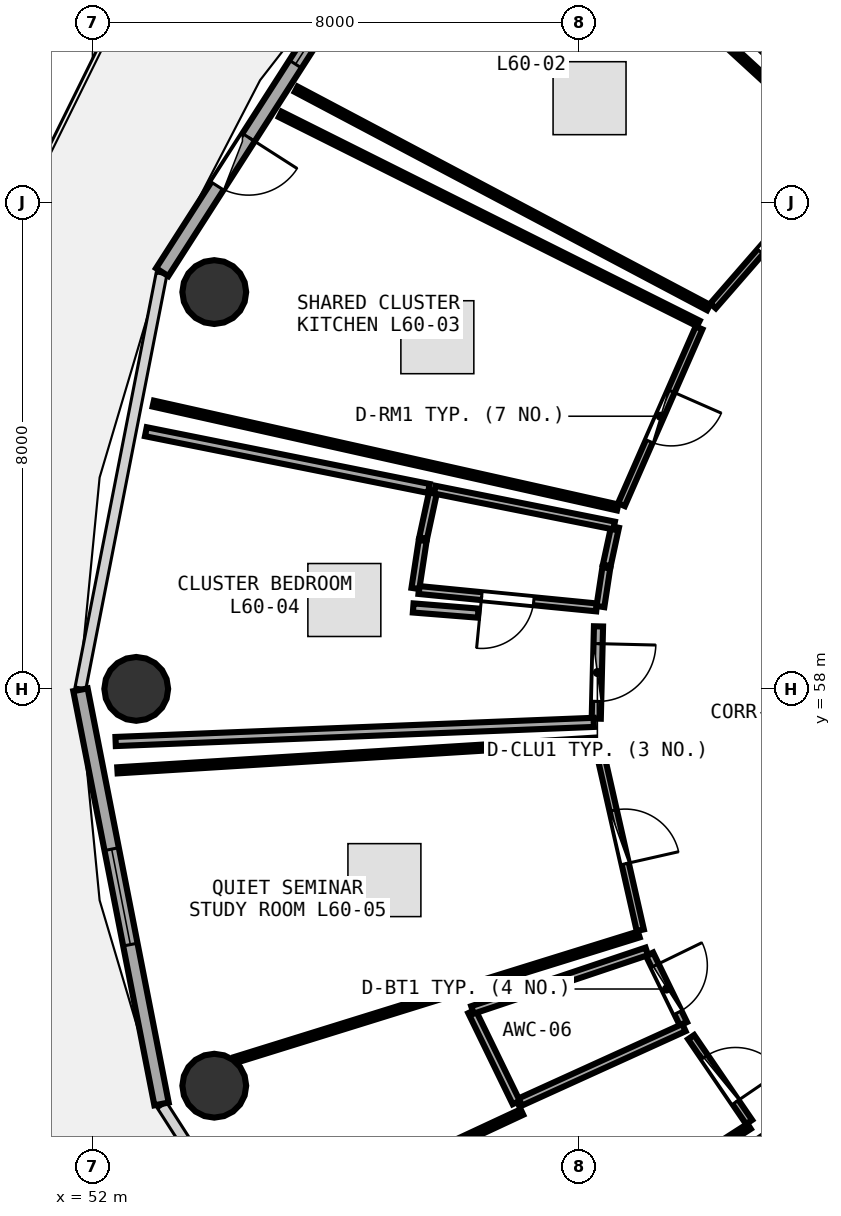
"""IFC4 building model, lengths in metres.
Left out: names, types, materials, properties, quantities, classifications, styles, units other than length and angle.
Written with IfcOpenShell. Run it as: python <this file> out.ifc"""

import sys

from ifc_helpers import new_model, si_unit, direction, frame, frame_2d, origin, origin_2d, place, context, subcontext, project, spatial, rectangle, circle, extrude, element, fill, save


model = new_model("IFC4")
c1 = context("Model", 3, precision=1e-05, world=origin(), true_north=direction((0.0, 1.0)))
c2 = subcontext(c1, "Body", "Model", "MODEL_VIEW")
j1 = project(units=[si_unit("LENGTHUNIT", "METRE"), si_unit("PLANEANGLEUNIT", "RADIAN")], contexts=[c1])
p1 = place(None, origin())
s1 = spatial("IfcSite", under=j1, at=p1, CompositionType="ELEMENT")
p2 = place(p1, origin())
s2 = spatial("IfcBuilding", under=s1, at=p2, CompositionType="ELEMENT")
p3 = place(p2, frame((0.0, 0.0, 234.45)))
s3 = spatial("IfcBuildingStorey", under=s2, at=p3, CompositionType="ELEMENT", Elevation=234.45)
for number, where, z_axis, x_axis in (
    (1, (54.003, 64.526, 0.0), (0.0, 0.0, 1.0), (1.0, 0.0, 0.0)),
    (2, (52.72, 58.0, 0.0), (0.0, 0.0, 1.0), (1.0, 0.0, 0.0)),
    (3, (54.003, 51.474, 0.0), (0.0, 0.0, 1.0), (1.0, 0.0, 0.0)),
):
    element("IfcColumn", number, at=place(p3, frame(where, z_axis=z_axis, x_axis=x_axis)), inside=s3, PredefinedType="COLUMN", context=c2, shape_type="SweptSolid", body=[
        extrude(circle(Radius=0.525, at=origin_2d()), origin(), (0.0, 0.0, 1.0), 3.75),
    ])
p4 = place(p3, frame((56.986, 70.843, 0.0), z_axis=(0.0, 0.0, 1.0), x_axis=(-0.539539512973, -0.841960280501, 0.0)))
e4 = element("IfcWall", 4, at=p4, inside=s3, PredefinedType="SOLIDWALL", context=c2, shape_type="SweptSolid", body=[
    extrude(rectangle(XDim=7.115, YDim=0.24, at=frame_2d((3.557, 0.0))), origin(), (0.0, 0.0, 1.0), 3.475),
])
p5 = place(p4, frame((4.482, 0.0, 0.0)))
e5 = element("IfcOpeningElement", 5, at=p5, cuts=e4, PredefinedType="OPENING", context=c2, shape_type="SweptSolid", body=[
    extrude(rectangle(XDim=0.95, YDim=2.1, at=frame_2d((0.475, 1.05))), frame((0.0, 0.13, 0.0), z_axis=(0.0, -1.0, 0.0), x_axis=(1.0, 0.0, 0.0)), (0.0, 0.0, 1.0), 0.26),
])
p6 = place(p4, frame((1.852, 0.0, 0.85)))
e6 = element("IfcOpeningElement", 6, at=p6, cuts=e4, PredefinedType="OPENING", context=c2, shape_type="SweptSolid", body=[
    extrude(rectangle(XDim=1.2, YDim=1.45, at=frame_2d((0.6, 0.725))), frame((0.0, 0.13, 0.0), z_axis=(0.0, -1.0, 0.0), x_axis=(1.0, 0.0, 0.0)), (0.0, 0.0, 1.0), 0.26),
])
p7 = place(p3, frame((51.803, 57.985, 0.0), z_axis=(0.0, 0.0, 1.0), x_axis=(0.192069055673, -0.981381413036, 0.0)))
e7 = element("IfcWall", 7, at=p7, inside=s3, PredefinedType="SOLIDWALL", context=c2, shape_type="SweptSolid", body=[
    extrude(rectangle(XDim=6.94, YDim=0.24, at=frame_2d((3.47, 0.0))), origin(), (0.0, 0.0, 1.0), 3.475),
])
p8 = place(p7, frame((2.67, 0.0, 0.85)))
e8 = element("IfcOpeningElement", 8, at=p8, cuts=e7, PredefinedType="OPENING", context=c2, shape_type="SweptSolid", body=[
    extrude(rectangle(XDim=1.6, YDim=1.45, at=frame_2d((0.8, 0.725))), frame((0.0, 0.13, 0.0), z_axis=(0.0, -1.0, 0.0), x_axis=(1.0, 0.0, 0.0)), (0.0, 0.0, 1.0), 0.26),
])
p9 = place(p3, frame((64.352, 66.763, 0.0), z_axis=(0.0, 0.0, 1.0), x_axis=(-0.656587461417, -0.75424989593, 0.0)))
e9 = element("IfcWall", 9, at=p9, inside=s3, PredefinedType="PARTITIONING", context=c2, shape_type="SweptSolid", body=[
    extrude(rectangle(XDim=3.267, YDim=0.12, at=frame_2d((1.634, 0.0))), origin(), (0.0, 0.0, 1.0), 3.025),
])
p10 = place(p9, frame((1.184, 0.0, 0.0)))
e10 = element("IfcOpeningElement", 10, at=p10, cuts=e9, PredefinedType="OPENING", context=c2, shape_type="SweptSolid", body=[
    extrude(rectangle(XDim=0.9, YDim=2.08, at=frame_2d((0.45, 1.04))), frame((0.0, 0.07, 0.0), z_axis=(0.0, -1.0, 0.0), x_axis=(1.0, 0.0, 0.0)), (0.0, 0.0, 1.0), 0.14),
])
p11 = place(p3, frame((61.976, 63.937, 0.0), z_axis=(0.0, 0.0, 1.0), x_axis=(-0.401802923717, -0.91572616567, 0.0)))
e11 = element("IfcWall", 11, at=p11, inside=s3, PredefinedType="PARTITIONING", context=c2, shape_type="SweptSolid", body=[
    extrude(rectangle(XDim=3.175, YDim=0.12, at=frame_2d((1.587, 0.0))), origin(), (0.0, 0.0, 1.0), 3.235),
])
p12 = place(p11, frame((1.137, 0.0, 0.0)))
e12 = element("IfcOpeningElement", 12, at=p12, cuts=e11, PredefinedType="OPENING", context=c2, shape_type="SweptSolid", body=[
    extrude(rectangle(XDim=0.9, YDim=2.08, at=frame_2d((0.45, 1.04))), frame((0.0, 0.07, 0.0), z_axis=(0.0, -1.0, 0.0), x_axis=(1.0, 0.0, 0.0)), (0.0, 0.0, 1.0), 0.14),
])
p13 = place(p3, frame((60.291, 59.34, 0.0), z_axis=(0.0, 0.0, 1.0), x_axis=(-0.995236750248, 0.097487491277, 0.0)))
e13 = element("IfcWall", 13, at=p13, inside=s3, PredefinedType="PLUMBINGWALL", context=c2, shape_type="SweptSolid", body=[
    extrude(rectangle(XDim=2.938, YDim=0.13, at=frame_2d((1.469, 0.0))), origin(), (0.0, 0.0, 1.0), 3.175),
])
p14 = place(p13, frame((1.039, 0.0, 0.0)))
e14 = element("IfcOpeningElement", 14, at=p14, cuts=e13, PredefinedType="OPENING", context=c2, shape_type="SweptSolid", body=[
    extrude(rectangle(XDim=0.86, YDim=2.05, at=frame_2d((0.43, 1.025))), frame((0.0, 0.075, 0.0), z_axis=(0.0, -1.0, 0.0), x_axis=(1.0, 0.0, 0.0)), (0.0, 0.0, 1.0), 0.15),
])
p15 = place(p3, frame((60.323, 59.028, 0.0), z_axis=(0.0, 0.0, 1.0), x_axis=(-0.024453580127, -0.999700966499, 0.0)))
e15 = element("IfcWall", 15, at=p15, inside=s3, PredefinedType="PARTITIONING", context=c2, shape_type="SweptSolid", body=[
    extrude(rectangle(XDim=1.518, YDim=0.15, at=frame_2d((0.759, 0.0))), origin(), (0.0, 0.0, 1.0), 3.025),
])
p16 = place(p15, frame((0.284, 0.0, 0.0)))
e16 = element("IfcOpeningElement", 16, at=p16, cuts=e15, PredefinedType="OPENING", context=c2, shape_type="SweptSolid", body=[
    extrude(rectangle(XDim=0.95, YDim=2.08, at=frame_2d((0.475, 1.04))), frame((0.0, 0.085, 0.0), z_axis=(0.0, -1.0, 0.0), x_axis=(1.0, 0.0, 0.0)), (0.0, 0.0, 1.0), 0.17),
])
p17 = place(p3, frame((60.316, 57.093, 0.0), z_axis=(0.0, 0.0, 1.0), x_axis=(0.22091500264, -0.975293064473, 0.0)))
e17 = element("IfcWall", 17, at=p17, inside=s3, PredefinedType="PARTITIONING", context=c2, shape_type="SweptSolid", body=[
    extrude(rectangle(XDim=3.139, YDim=0.12, at=frame_2d((1.569, 0.0))), origin(), (0.0, 0.0, 1.0), 3.48),
])
p18 = place(p17, frame((1.119, 0.0, 0.0)))
e18 = element("IfcOpeningElement", 18, at=p18, cuts=e17, PredefinedType="OPENING", context=c2, shape_type="SweptSolid", body=[
    extrude(rectangle(XDim=0.9, YDim=2.08, at=frame_2d((0.45, 1.04))), frame((0.0, 0.07, 0.0), z_axis=(0.0, -1.0, 0.0), x_axis=(1.0, 0.0, 0.0)), (0.0, 0.0, 1.0), 0.14),
])
p19 = place(p3, frame((61.162, 53.636, 0.0), z_axis=(0.0, 0.0, 1.0), x_axis=(0.437981349822, -0.898984058373, 0.0)))
e19 = element("IfcWall", 19, at=p19, inside=s3, PredefinedType="PLUMBINGWALL", context=c2, shape_type="SweptSolid", body=[
    extrude(rectangle(XDim=1.273, YDim=0.13, at=frame_2d((0.636, 0.0))), origin(), (0.0, 0.0, 1.0), 3.235),
])
p20 = place(p19, frame((0.206, 0.0, 0.0)))
e20 = element("IfcOpeningElement", 20, at=p20, cuts=e19, PredefinedType="OPENING", context=c2, shape_type="SweptSolid", body=[
    extrude(rectangle(XDim=0.86, YDim=2.05, at=frame_2d((0.43, 1.025))), frame((0.0, 0.075, 0.0), z_axis=(0.0, -1.0, 0.0), x_axis=(1.0, 0.0, 0.0)), (0.0, 0.0, 1.0), 0.15),
])
p21 = place(p3, frame((61.846, 52.273, 0.0), z_axis=(0.0, 0.0, 1.0), x_axis=(0.563860796601, -0.825869845712, 0.0)))
e21 = element("IfcWall", 21, at=p21, inside=s3, PredefinedType="PARTITIONING", context=c2, shape_type="SweptSolid", body=[
    extrude(rectangle(XDim=1.691, YDim=0.12, at=frame_2d((0.846, 0.0))), origin(), (0.0, 0.0, 1.0), 3.025),
])
p22 = place(p21, frame((0.396, 0.0, 0.0)))
e22 = element("IfcOpeningElement", 22, at=p22, cuts=e21, PredefinedType="OPENING", context=c2, shape_type="SweptSolid", body=[
    extrude(rectangle(XDim=0.9, YDim=2.08, at=frame_2d((0.45, 1.04))), frame((0.0, 0.07, 0.0), z_axis=(0.0, -1.0, 0.0), x_axis=(1.0, 0.0, 0.0)), (0.0, 0.0, 1.0), 0.14),
])
p23 = place(p3, frame((64.605, 67.044, 0.0), z_axis=(0.0, 0.0, 1.0), x_axis=(-0.719927885424, 0.694048874208, 0.0)))
e23 = element("IfcWall", 23, at=p23, inside=s3, PredefinedType="PARTITIONING", context=c2, shape_type="SweptSolid", body=[
    extrude(rectangle(XDim=7.453, YDim=0.15, at=frame_2d((3.727, 0.0))), origin(), (0.0, 0.0, 1.0), 3.075),
])
p24 = place(p3, frame((62.132, 64.272, 0.0), z_axis=(0.0, 0.0, 1.0), x_axis=(-0.883813456485, 0.467839474752, 0.0)))
e24 = element("IfcWall", 24, at=p24, inside=s3, PredefinedType="PARTITIONING", context=c2, shape_type="SweptSolid", body=[
    extrude(rectangle(XDim=7.673, YDim=0.1, at=frame_2d((3.836, 0.0))), origin(), (0.0, 0.0, 1.0), 3.025),
])
p25 = place(p3, frame((58.857, 71.888, 0.0), z_axis=(0.0, 0.0, 1.0), x_axis=(0.736669736632, -0.676252688815, 0.0)))
e25 = element("IfcWall", 25, at=p25, inside=s3, PredefinedType="PARTITIONING", context=c2, shape_type="SweptSolid", body=[
    extrude(rectangle(XDim=7.472, YDim=0.1, at=frame_2d((3.736, 0.0))), origin(), (0.0, 0.0, 1.0), 3.075),
])
p26 = place(p3, frame((60.637, 60.984, 0.0), z_axis=(0.0, 0.0, 1.0), x_axis=(-0.97589770928, 0.218228460612, 0.0)))
e26 = element("IfcWall", 26, at=p26, inside=s3, PredefinedType="PARTITIONING", context=c2, shape_type="SweptSolid", body=[
    extrude(rectangle(XDim=7.826, YDim=0.1, at=frame_2d((3.913, 0.0))), origin(), (0.0, 0.0, 1.0), 3.075),
])
p27 = place(p3, frame((55.088, 67.448, 0.0), z_axis=(0.0, 0.0, 1.0), x_axis=(0.894433542293, -0.447200892688, 0.0)))
e27 = element("IfcWall", 27, at=p27, inside=s3, PredefinedType="PARTITIONING", context=c2, shape_type="SweptSolid", body=[
    extrude(rectangle(XDim=7.688, YDim=0.1, at=frame_2d((3.844, 0.0))), origin(), (0.0, 0.0, 1.0), 3.025),
])
p28 = place(p3, frame((60.595, 60.663, 0.0), z_axis=(0.0, 0.0, 1.0), x_axis=(-0.211050082749, -0.977475249084, 0.0)))
e28 = element("IfcWall", 28, at=p28, inside=s3, PredefinedType="PLUMBINGWALL", context=c2, shape_type="SweptSolid", body=[
    extrude(rectangle(XDim=0.647, YDim=0.13, at=frame_2d((0.323, 0.0))), origin(), (0.0, 0.0, 1.0), 3.48),
])
p29 = place(p3, frame((60.451, 59.991, 0.0), z_axis=(0.0, 0.0, 1.0), x_axis=(-0.150321319766, -0.988637193729, 0.0)))
e29 = element("IfcWall", 29, at=p29, inside=s3, PredefinedType="PLUMBINGWALL", context=c2, shape_type="SweptSolid", body=[
    extrude(rectangle(XDim=0.645, YDim=0.13, at=frame_2d((0.322, 0.0))), origin(), (0.0, 0.0, 1.0), 3.48),
])
p30 = place(p3, frame((57.311, 59.652, 0.0), z_axis=(0.0, 0.0, 1.0), x_axis=(0.150331405734, 0.988635660114, 0.0)))
e30 = element("IfcWall", 30, at=p30, inside=s3, PredefinedType="PLUMBINGWALL", context=c2, shape_type="SweptSolid", body=[
    extrude(rectangle(XDim=0.797, YDim=0.13, at=frame_2d((0.399, 0.0))), origin(), (0.0, 0.0, 1.0), 3.48),
])
p31 = place(p3, frame((57.438, 60.479, 0.0), z_axis=(0.0, 0.0, 1.0), x_axis=(0.210843597485, 0.977519809211, 0.0)))
e31 = element("IfcWall", 31, at=p31, inside=s3, PredefinedType="PLUMBINGWALL", context=c2, shape_type="SweptSolid", body=[
    extrude(rectangle(XDim=0.799, YDim=0.13, at=frame_2d((0.399, 0.0))), origin(), (0.0, 0.0, 1.0), 3.48),
])
p32 = place(p3, frame((57.631, 61.276, 0.0), z_axis=(0.0, 0.0, 1.0), x_axis=(0.980543188147, -0.196303479793, 0.0)))
e32 = element("IfcWall", 32, at=p32, inside=s3, PredefinedType="PLUMBINGWALL", context=c2, shape_type="SweptSolid", body=[
    extrude(rectangle(XDim=3.007, YDim=0.13, at=frame_2d((1.504, 0.0))), origin(), (0.0, 0.0, 1.0), 3.175),
])
p33 = place(p3, frame((60.244, 57.449, 0.0), z_axis=(0.0, 0.0, 1.0), x_axis=(-0.999198776547, -0.040022555479, 0.0)))
e33 = element("IfcWall", 33, at=p33, inside=s3, PredefinedType="PARTITIONING", context=c2, shape_type="SweptSolid", body=[
    extrude(rectangle(XDim=7.869, YDim=0.15, at=frame_2d((3.935, 0.0))), origin(), (0.0, 0.0, 1.0), 3.075),
])
p34 = place(p3, frame((52.878, 62.229, 0.0), z_axis=(0.0, 0.0, 1.0), x_axis=(0.980491563171, -0.196561172538, 0.0)))
e34 = element("IfcWall", 34, at=p34, inside=s3, PredefinedType="PARTITIONING", context=c2, shape_type="SweptSolid", body=[
    extrude(rectangle(XDim=4.747, YDim=0.15, at=frame_2d((2.374, 0.0))), origin(), (0.0, 0.0, 1.0), 3.075),
])
p35 = place(p3, frame((57.275, 59.331, 0.0), z_axis=(0.0, 0.0, 1.0), x_axis=(0.996837682514, -0.079464675924, 0.0)))
e35 = element("IfcWall", 35, at=p35, inside=s3, PredefinedType="PARTITIONING", context=c2, shape_type="SweptSolid", body=[
    extrude(rectangle(XDim=1.072, YDim=0.15, at=frame_2d((0.536, 0.0))), origin(), (0.0, 0.0, 1.0), 3.175),
])
p36 = place(p3, frame((60.985, 53.961, 0.0), z_axis=(0.0, 0.0, 1.0), x_axis=(-0.954952218503, -0.29675960031, 0.0)))
e36 = element("IfcWall", 36, at=p36, inside=s3, PredefinedType="PARTITIONING", context=c2, shape_type="SweptSolid", body=[
    extrude(rectangle(XDim=6.946, YDim=0.1, at=frame_2d((3.473, 0.0))), origin(), (0.0, 0.0, 1.0), 3.175),
])
p37 = place(p3, frame((52.411, 56.66, 0.0), z_axis=(0.0, 0.0, 1.0), x_axis=(0.998074132124, 0.06203246557, 0.0)))
e37 = element("IfcWall", 37, at=p37, inside=s3, PredefinedType="PARTITIONING", context=c2, shape_type="SweptSolid", body=[
    extrude(rectangle(XDim=7.867, YDim=0.1, at=frame_2d((3.934, 0.0))), origin(), (0.0, 0.0, 1.0), 3.075),
])
p38 = place(p3, frame((61.728, 52.43, 0.0), z_axis=(0.0, 0.0, 1.0), x_axis=(-0.910394340166, -0.413741640874, 0.0)))
e38 = element("IfcWall", 38, at=p38, inside=s3, PredefinedType="PLUMBINGWALL", context=c2, shape_type="SweptSolid", body=[
    extrude(rectangle(XDim=3.0, YDim=0.13, at=frame_2d((1.5, 0.0))), origin(), (0.0, 0.0, 1.0), 3.025),
])
p39 = place(p3, frame((58.969, 51.198, 0.0), z_axis=(0.0, 0.0, 1.0), x_axis=(-0.437811526414, 0.899066775795, 0.0)))
e39 = element("IfcWall", 39, at=p39, inside=s3, PredefinedType="PLUMBINGWALL", context=c2, shape_type="SweptSolid", body=[
    extrude(rectangle(XDim=1.666, YDim=0.13, at=frame_2d((0.833, 0.0))), origin(), (0.0, 0.0, 1.0), 3.025),
])
p40 = place(p3, frame((58.25, 52.72, 0.0), z_axis=(0.0, 0.0, 1.0), x_axis=(0.947938024122, 0.318454867169, 0.0)))
e40 = element("IfcWall", 40, at=p40, inside=s3, PredefinedType="PLUMBINGWALL", context=c2, shape_type="SweptSolid", body=[
    extrude(rectangle(XDim=3.024, YDim=0.13, at=frame_2d((1.512, 0.0))), origin(), (0.0, 0.0, 1.0), 3.175),
])
p41 = place(p3, frame((62.799, 50.805, 0.0), z_axis=(0.0, 0.0, 1.0), x_axis=(-0.841021030646, -0.541002426992, 0.0)))
e41 = element("IfcWall", 41, at=p41, inside=s3, PredefinedType="PARTITIONING", context=c2, shape_type="SweptSolid", body=[
    extrude(rectangle(XDim=7.609, YDim=0.1, at=frame_2d((3.805, 0.0))), origin(), (0.0, 0.0, 1.0), 3.075),
])
p42 = place(p3, frame((54.79, 49.049, 0.0), z_axis=(0.0, 0.0, 1.0), x_axis=(0.906304818196, 0.422624628381, 0.0)))
e42 = element("IfcWall", 42, at=p42, inside=s3, PredefinedType="PARTITIONING", context=c2, shape_type="SweptSolid", body=[
    extrude(rectangle(XDim=4.714, YDim=0.1, at=frame_2d((2.357, 0.0))), origin(), (0.0, 0.0, 1.0), 3.075),
])
p43 = place(p5, frame((0.95, 0.0, 0.0), z_axis=(0.0, 0.0, 1.0), x_axis=(-1.0, 0.0, 0.0)))
e43 = element("IfcDoor", 43, at=p43, inside=s3, OperationType="SINGLE_SWING_RIGHT", PredefinedType="DOOR", context=c2, shape_type="SweptSolid", body=[
    extrude(rectangle(XDim=0.95, YDim=2.1, at=frame_2d((0.475, 1.05))), frame((0.0, 0.025, 0.0), z_axis=(0.0, -1.0, 0.0), x_axis=(1.0, 0.0, 0.0)), (0.0, 0.0, 1.0), 0.05),
])
fill(e5, e43)
p44 = place(p6, origin())
e44 = element("IfcWindow", 44, at=p44, inside=s3, PartitioningType="SINGLE_PANEL", PredefinedType="WINDOW", context=c2, shape_type="SweptSolid", body=[
    extrude(rectangle(XDim=1.2, YDim=1.45, at=frame_2d((0.6, 0.725))), frame((0.0, 0.03, 0.0), z_axis=(0.0, -1.0, 0.0), x_axis=(1.0, 0.0, 0.0)), (0.0, 0.0, 1.0), 0.06),
])
fill(e6, e44)
p45 = place(p8, origin())
e45 = element("IfcWindow", 45, at=p45, inside=s3, PartitioningType="SINGLE_PANEL", PredefinedType="WINDOW", context=c2, shape_type="SweptSolid", body=[
    extrude(rectangle(XDim=1.6, YDim=1.45, at=frame_2d((0.8, 0.725))), frame((0.0, 0.03, 0.0), z_axis=(0.0, -1.0, 0.0), x_axis=(1.0, 0.0, 0.0)), (0.0, 0.0, 1.0), 0.06),
])
fill(e8, e45)
p46 = place(p10, origin())
e46 = element("IfcDoor", 46, at=p46, inside=s3, OperationType="SINGLE_SWING_RIGHT", PredefinedType="DOOR", context=c2, shape_type="SweptSolid", body=[
    extrude(rectangle(XDim=0.9, YDim=2.08, at=frame_2d((0.45, 1.04))), frame((0.0, 0.025, 0.0), z_axis=(0.0, -1.0, 0.0), x_axis=(1.0, 0.0, 0.0)), (0.0, 0.0, 1.0), 0.05),
])
fill(e10, e46)
p47 = place(p12, origin())
e47 = element("IfcDoor", 47, at=p47, inside=s3, OperationType="SINGLE_SWING_LEFT", PredefinedType="DOOR", context=c2, shape_type="SweptSolid", body=[
    extrude(rectangle(XDim=0.9, YDim=2.08, at=frame_2d((0.45, 1.04))), frame((0.0, 0.025, 0.0), z_axis=(0.0, -1.0, 0.0), x_axis=(1.0, 0.0, 0.0)), (0.0, 0.0, 1.0), 0.05),
])
fill(e12, e47)
p48 = place(p14, origin())
e48 = element("IfcDoor", 48, at=p48, inside=s3, OperationType="SINGLE_SWING_RIGHT", PredefinedType="DOOR", context=c2, shape_type="SweptSolid", body=[
    extrude(rectangle(XDim=0.86, YDim=2.05, at=frame_2d((0.43, 1.025))), frame((0.0, 0.025, 0.0), z_axis=(0.0, -1.0, 0.0), x_axis=(1.0, 0.0, 0.0)), (0.0, 0.0, 1.0), 0.05),
])
fill(e14, e48)
p49 = place(p16, origin())
e49 = element("IfcDoor", 49, at=p49, inside=s3, OperationType="SINGLE_SWING_LEFT", PredefinedType="DOOR", context=c2, shape_type="SweptSolid", body=[
    extrude(rectangle(XDim=0.95, YDim=2.08, at=frame_2d((0.475, 1.04))), frame((0.0, 0.025, 0.0), z_axis=(0.0, -1.0, 0.0), x_axis=(1.0, 0.0, 0.0)), (0.0, 0.0, 1.0), 0.05),
])
fill(e16, e49)
p50 = place(p18, origin())
e50 = element("IfcDoor", 50, at=p50, inside=s3, OperationType="SINGLE_SWING_RIGHT", PredefinedType="DOOR", context=c2, shape_type="SweptSolid", body=[
    extrude(rectangle(XDim=0.9, YDim=2.08, at=frame_2d((0.45, 1.04))), frame((0.0, 0.025, 0.0), z_axis=(0.0, -1.0, 0.0), x_axis=(1.0, 0.0, 0.0)), (0.0, 0.0, 1.0), 0.05),
])
fill(e18, e50)
p51 = place(p20, origin())
e51 = element("IfcDoor", 51, at=p51, inside=s3, OperationType="SINGLE_SWING_LEFT", PredefinedType="DOOR", context=c2, shape_type="SweptSolid", body=[
    extrude(rectangle(XDim=0.86, YDim=2.05, at=frame_2d((0.43, 1.025))), frame((0.0, 0.025, 0.0), z_axis=(0.0, -1.0, 0.0), x_axis=(1.0, 0.0, 0.0)), (0.0, 0.0, 1.0), 0.05),
])
fill(e20, e51)
p52 = place(p22, origin())
e52 = element("IfcDoor", 52, at=p52, inside=s3, OperationType="SINGLE_SWING_RIGHT", PredefinedType="DOOR", context=c2, shape_type="SweptSolid", body=[
    extrude(rectangle(XDim=0.9, YDim=2.08, at=frame_2d((0.45, 1.04))), frame((0.0, 0.025, 0.0), z_axis=(0.0, -1.0, 0.0), x_axis=(1.0, 0.0, 0.0)), (0.0, 0.0, 1.0), 0.05),
])
fill(e22, e52)
save(model, sys.argv[1])
